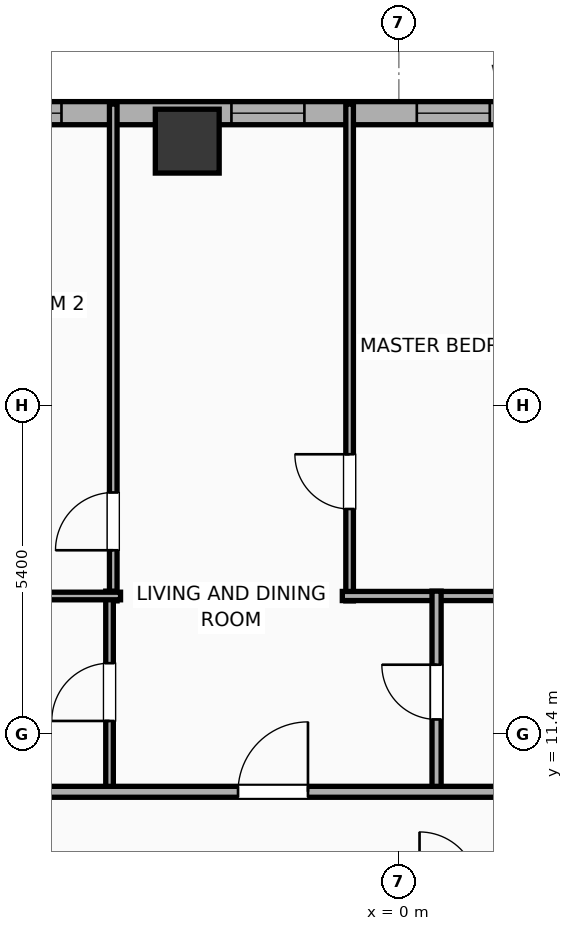
"""IFC4 building model, lengths in metres.
Left out: names, types, materials, properties, quantities, classifications, styles, units other than length and angle.
Written with IfcOpenShell. Run it as: python <this file> out.ifc"""

import sys

from ifc_helpers import new_model, si_unit, direction, frame, frame_2d, origin, origin_2d, place, context, subcontext, project, spatial, rectangle, hollow_rectangle, extrude, element, fill, save


model = new_model("IFC4")
c1 = context("Model", 3, precision=1e-05, world=origin(), true_north=direction((0.0, 1.0)))
c2 = subcontext(c1, "Body", "Model", "MODEL_VIEW")
j1 = project(units=[si_unit("LENGTHUNIT", "METRE"), si_unit("PLANEANGLEUNIT", "RADIAN")], contexts=[c1])
p1 = place(None, origin())
s1 = spatial("IfcSite", under=j1, at=p1, CompositionType="ELEMENT")
p2 = place(p1, origin())
s2 = spatial("IfcBuilding", under=s1, at=p2, CompositionType="ELEMENT")
p3 = place(p2, frame((0.0, 0.0, 93.6)))
s3 = spatial("IfcBuildingStorey", under=s2, at=p3, CompositionType="ELEMENT", Elevation=93.6)
p4 = place(p3, frame((-3.48, 21.15, 0.0), z_axis=(0.0, 0.0, 1.0), x_axis=(1.0, 0.0, 0.0)))
e1 = element("IfcColumn", 1, at=p4, inside=s3, PredefinedType="COLUMN", context=c2, shape_type="SweptSolid", body=[
    extrude(hollow_rectangle(XDim=1.05, YDim=1.05, WallThickness=0.036, at=origin_2d()), origin(), (0.0, 0.0, 1.0), 3.9),
])
p5 = place(p3, frame((-25.381, 21.61, 0.0), z_axis=(0.0, 0.0, 1.0), x_axis=(1.0, 0.0, 0.0)))
e2 = element("IfcWall", 2, at=p5, inside=s3, PredefinedType="ELEMENTEDWALL", context=c2, shape_type="SweptSolid", body=[
    extrude(rectangle(XDim=54.763, YDim=0.38, at=frame_2d((27.381, 0.0))), origin(), (0.0, 0.0, 1.0), 3.65),
])
p6 = place(p5, frame((4.795, 0.0, 0.75)))
e3 = element("IfcOpeningElement", 3, at=p6, cuts=e2, PredefinedType="OPENING", context=c2, shape_type="SweptSolid", body=[
    extrude(rectangle(XDim=2.4, YDim=2.1, at=frame_2d((1.2, 1.05))), frame((0.0, 0.2, 0.0), z_axis=(0.0, -1.0, 0.0), x_axis=(1.0, 0.0, 0.0)), (0.0, 0.0, 1.0), 0.4),
])
p7 = place(p5, frame((2.377, 0.0, 0.75)))
e4 = element("IfcOpeningElement", 4, at=p7, cuts=e2, PredefinedType="OPENING", context=c2, shape_type="SweptSolid", body=[
    extrude(rectangle(XDim=1.2, YDim=2.05, at=frame_2d((0.6, 1.025))), frame((0.0, 0.2, 0.0), z_axis=(0.0, -1.0, 0.0), x_axis=(1.0, 0.0, 0.0)), (0.0, 0.0, 1.0), 0.4),
])
p8 = place(p5, frame((11.707, 0.0, 0.75)))
e5 = element("IfcOpeningElement", 5, at=p8, cuts=e2, PredefinedType="OPENING", context=c2, shape_type="SweptSolid", body=[
    extrude(rectangle(XDim=1.2, YDim=2.05, at=frame_2d((0.6, 1.025))), frame((0.0, 0.2, 0.0), z_axis=(0.0, -1.0, 0.0), x_axis=(1.0, 0.0, 0.0)), (0.0, 0.0, 1.0), 0.4),
])
p9 = place(p5, frame((8.312, 0.0, 0.75)))
e6 = element("IfcOpeningElement", 6, at=p9, cuts=e2, PredefinedType="OPENING", context=c2, shape_type="SweptSolid", body=[
    extrude(rectangle(XDim=1.2, YDim=2.05, at=frame_2d((0.6, 1.025))), frame((0.0, 0.2, 0.0), z_axis=(0.0, -1.0, 0.0), x_axis=(1.0, 0.0, 0.0)), (0.0, 0.0, 1.0), 0.4),
])
p10 = place(p5, frame((15.476, 0.0, 0.75)))
e7 = element("IfcOpeningElement", 7, at=p10, cuts=e2, PredefinedType="OPENING", context=c2, shape_type="SweptSolid", body=[
    extrude(rectangle(XDim=1.2, YDim=2.05, at=frame_2d((0.6, 1.025))), frame((0.0, 0.2, 0.0), z_axis=(0.0, -1.0, 0.0), x_axis=(1.0, 0.0, 0.0)), (0.0, 0.0, 1.0), 0.4),
])
p11 = place(p5, frame((22.628, 0.0, 0.75)))
e8 = element("IfcOpeningElement", 8, at=p11, cuts=e2, PredefinedType="OPENING", context=c2, shape_type="SweptSolid", body=[
    extrude(rectangle(XDim=1.2, YDim=2.05, at=frame_2d((0.6, 1.025))), frame((0.0, 0.2, 0.0), z_axis=(0.0, -1.0, 0.0), x_axis=(1.0, 0.0, 0.0)), (0.0, 0.0, 1.0), 0.4),
])
p12 = place(p5, frame((18.633, 0.0, 0.75)))
e9 = element("IfcOpeningElement", 9, at=p12, cuts=e2, PredefinedType="OPENING", context=c2, shape_type="SweptSolid", body=[
    extrude(rectangle(XDim=1.2, YDim=2.05, at=frame_2d((0.6, 1.025))), frame((0.0, 0.2, 0.0), z_axis=(0.0, -1.0, 0.0), x_axis=(1.0, 0.0, 0.0)), (0.0, 0.0, 1.0), 0.4),
])
p13 = place(p5, frame((25.676, 0.0, 0.75)))
e10 = element("IfcOpeningElement", 10, at=p13, cuts=e2, PredefinedType="OPENING", context=c2, shape_type="SweptSolid", body=[
    extrude(rectangle(XDim=1.2, YDim=2.05, at=frame_2d((0.6, 1.025))), frame((0.0, 0.2, 0.0), z_axis=(0.0, -1.0, 0.0), x_axis=(1.0, 0.0, 0.0)), (0.0, 0.0, 1.0), 0.4),
])
p14 = place(p5, frame((30.881, 0.0, 0.75)))
e11 = element("IfcOpeningElement", 11, at=p14, cuts=e2, PredefinedType="OPENING", context=c2, shape_type="SweptSolid", body=[
    extrude(rectangle(XDim=1.2, YDim=2.05, at=frame_2d((0.6, 1.025))), frame((0.0, 0.2, 0.0), z_axis=(0.0, -1.0, 0.0), x_axis=(1.0, 0.0, 0.0)), (0.0, 0.0, 1.0), 0.4),
])
p15 = place(p5, frame((28.686, 0.0, 0.75)))
e12 = element("IfcOpeningElement", 12, at=p15, cuts=e2, PredefinedType="OPENING", context=c2, shape_type="SweptSolid", body=[
    extrude(rectangle(XDim=1.2, YDim=2.05, at=frame_2d((0.6, 1.025))), frame((0.0, 0.2, 0.0), z_axis=(0.0, -1.0, 0.0), x_axis=(1.0, 0.0, 0.0)), (0.0, 0.0, 1.0), 0.4),
])
p16 = place(p5, frame((35.876, 0.0, 0.75)))
e13 = element("IfcOpeningElement", 13, at=p16, cuts=e2, PredefinedType="OPENING", context=c2, shape_type="SweptSolid", body=[
    extrude(rectangle(XDim=1.2, YDim=2.05, at=frame_2d((0.6, 1.025))), frame((0.0, 0.2, 0.0), z_axis=(0.0, -1.0, 0.0), x_axis=(1.0, 0.0, 0.0)), (0.0, 0.0, 1.0), 0.4),
])
p17 = place(p5, frame((40.976, 0.0, 0.75)))
e14 = element("IfcOpeningElement", 14, at=p17, cuts=e2, PredefinedType="OPENING", context=c2, shape_type="SweptSolid", body=[
    extrude(rectangle(XDim=1.2, YDim=2.05, at=frame_2d((0.6, 1.025))), frame((0.0, 0.2, 0.0), z_axis=(0.0, -1.0, 0.0), x_axis=(1.0, 0.0, 0.0)), (0.0, 0.0, 1.0), 0.4),
])
p18 = place(p5, frame((46.076, 0.0, 0.75)))
e15 = element("IfcOpeningElement", 15, at=p18, cuts=e2, PredefinedType="OPENING", context=c2, shape_type="SweptSolid", body=[
    extrude(rectangle(XDim=1.2, YDim=2.05, at=frame_2d((0.6, 1.025))), frame((0.0, 0.2, 0.0), z_axis=(0.0, -1.0, 0.0), x_axis=(1.0, 0.0, 0.0)), (0.0, 0.0, 1.0), 0.4),
])
p19 = place(p5, frame((50.527, 0.0, 0.75)))
e16 = element("IfcOpeningElement", 16, at=p19, cuts=e2, PredefinedType="OPENING", context=c2, shape_type="SweptSolid", body=[
    extrude(rectangle(XDim=1.2, YDim=2.05, at=frame_2d((0.6, 1.025))), frame((0.0, 0.2, 0.0), z_axis=(0.0, -1.0, 0.0), x_axis=(1.0, 0.0, 0.0)), (0.0, 0.0, 1.0), 0.4),
])
p20 = place(p3, frame((-4.697, 13.59, 0.0), z_axis=(0.0, 0.0, 1.0), x_axis=(0.0, 1.0, 0.0)))
e17 = element("IfcWall", 17, at=p20, inside=s3, PredefinedType="PARTITIONING", context=c2, shape_type="SweptSolid", body=[
    extrude(rectangle(XDim=8.17, YDim=0.125, at=frame_2d((4.085, 0.0))), origin(), (0.0, 0.0, 1.0), 3.65),
])
p21 = place(p20, frame((0.832, 0.0, 0.0)))
e18 = element("IfcOpeningElement", 18, at=p21, cuts=e17, PredefinedType="OPENING", context=c2, shape_type="SweptSolid", body=[
    extrude(rectangle(XDim=0.95, YDim=2.05, at=frame_2d((0.475, 1.025))), frame((0.0, 0.073, 0.0), z_axis=(0.0, -1.0, 0.0), x_axis=(1.0, 0.0, 0.0)), (0.0, 0.0, 1.0), 0.145),
])
p22 = place(p3, frame((-0.81, 13.59, 0.0), z_axis=(0.0, 0.0, 1.0), x_axis=(0.0, 1.0, 0.0)))
e19 = element("IfcWall", 19, at=p22, inside=s3, PredefinedType="PARTITIONING", context=c2, shape_type="SweptSolid", body=[
    extrude(rectangle(XDim=8.17, YDim=0.125, at=frame_2d((4.085, 0.0))), origin(), (0.0, 0.0, 1.0), 3.65),
])
p23 = place(p22, frame((1.511, 0.0, 0.0)))
e20 = element("IfcOpeningElement", 20, at=p23, cuts=e19, PredefinedType="OPENING", context=c2, shape_type="SweptSolid", body=[
    extrude(rectangle(XDim=0.9, YDim=2.05, at=frame_2d((0.45, 1.025))), frame((0.0, 0.073, 0.0), z_axis=(0.0, -1.0, 0.0), x_axis=(1.0, 0.0, 0.0)), (0.0, 0.0, 1.0), 0.145),
])
p24 = place(p3, frame((-0.93, 13.67, 0.0), z_axis=(0.0, 0.0, 1.0), x_axis=(1.0, 0.0, 0.0)))
e21 = element("IfcWall", 21, at=p24, inside=s3, PredefinedType="PLUMBINGWALL", context=c2, shape_type="SweptSolid", body=[
    extrude(rectangle(XDim=3.605, YDim=0.15, at=frame_2d((1.802, 0.0))), origin(), (0.0, 0.0, 1.0), 3.65),
])
p25 = place(p3, frame((-4.758, 10.43, 0.0), z_axis=(0.0, 0.0, 1.0), x_axis=(0.0, 1.0, 0.0)))
e22 = element("IfcWall", 22, at=p25, inside=s3, PredefinedType="PARTITIONING", context=c2, shape_type="SweptSolid", body=[
    extrude(rectangle(XDim=3.32, YDim=0.125, at=frame_2d((1.66, 0.0))), origin(), (0.0, 0.0, 1.0), 3.65),
])
p26 = place(p25, frame((1.185, 0.0, 0.0)))
e23 = element("IfcOpeningElement", 23, at=p26, cuts=e22, PredefinedType="OPENING", context=c2, shape_type="SweptSolid", body=[
    extrude(rectangle(XDim=0.95, YDim=2.05, at=frame_2d((0.475, 1.025))), frame((0.0, 0.073, 0.0), z_axis=(0.0, -1.0, 0.0), x_axis=(1.0, 0.0, 0.0)), (0.0, 0.0, 1.0), 0.145),
])
p27 = place(p3, frame((-7.675, 13.67, 0.0), z_axis=(0.0, 0.0, 1.0), x_axis=(1.0, 0.0, 0.0)))
e24 = element("IfcWall", 24, at=p27, inside=s3, PredefinedType="PARTITIONING", context=c2, shape_type="SweptSolid", body=[
    extrude(rectangle(XDim=3.098, YDim=0.125, at=frame_2d((1.549, 0.0))), origin(), (0.0, 0.0, 1.0), 3.65),
])
p28 = place(p3, frame((0.62, 10.43, 0.0), z_axis=(0.0, 0.0, 1.0), x_axis=(0.0, 1.0, 0.0)))
e25 = element("IfcWall", 25, at=p28, inside=s3, PredefinedType="PLUMBINGWALL", context=c2, shape_type="SweptSolid", body=[
    extrude(rectangle(XDim=3.32, YDim=0.15, at=frame_2d((1.66, 0.0))), origin(), (0.0, 0.0, 1.0), 3.65),
])
p29 = place(p28, frame((1.21, 0.0, 0.0)))
e26 = element("IfcOpeningElement", 26, at=p29, cuts=e25, PredefinedType="OPENING", context=c2, shape_type="SweptSolid", body=[
    extrude(rectangle(XDim=0.9, YDim=2.05, at=frame_2d((0.45, 1.025))), frame((0.0, 0.085, 0.0), z_axis=(0.0, -1.0, 0.0), x_axis=(1.0, 0.0, 0.0)), (0.0, 0.0, 1.0), 0.17),
])
p30 = place(p3, frame((-29.21, 10.45, 0.0), z_axis=(0.0, 0.0, 1.0), x_axis=(1.0, 0.0, 0.0)))
e27 = element("IfcWall", 27, at=p30, inside=s3, PredefinedType="PARTITIONING", context=c2, shape_type="SweptSolid", body=[
    extrude(rectangle(XDim=62.42, YDim=0.18, at=frame_2d((31.21, 0.0))), origin(), (0.0, 0.0, 1.0), 3.65),
])
p31 = place(p30, frame((2.534, 0.0, 0.0)))
e28 = element("IfcOpeningElement", 28, at=p31, cuts=e27, PredefinedType="OPENING", context=c2, shape_type="SweptSolid", body=[
    extrude(rectangle(XDim=0.9, YDim=2.05, at=frame_2d((0.45, 1.025))), frame((0.0, 0.1, 0.0), z_axis=(0.0, -1.0, 0.0), x_axis=(1.0, 0.0, 0.0)), (0.0, 0.0, 1.0), 0.2),
])
p32 = place(p30, frame((9.056, 0.0, 0.0)))
e29 = element("IfcOpeningElement", 29, at=p32, cuts=e27, PredefinedType="OPENING", context=c2, shape_type="SweptSolid", body=[
    extrude(rectangle(XDim=1.15, YDim=2.05, at=frame_2d((0.575, 1.025))), frame((0.0, 0.1, 0.0), z_axis=(0.0, -1.0, 0.0), x_axis=(1.0, 0.0, 0.0)), (0.0, 0.0, 1.0), 0.2),
])
p33 = place(p30, frame((16.303, 0.0, 0.0)))
e30 = element("IfcOpeningElement", 30, at=p33, cuts=e27, PredefinedType="OPENING", context=c2, shape_type="SweptSolid", body=[
    extrude(rectangle(XDim=1.15, YDim=2.05, at=frame_2d((0.575, 1.025))), frame((0.0, 0.1, 0.0), z_axis=(0.0, -1.0, 0.0), x_axis=(1.0, 0.0, 0.0)), (0.0, 0.0, 1.0), 0.2),
])
p34 = place(p30, frame((26.565, 0.0, 0.0)))
e31 = element("IfcOpeningElement", 31, at=p34, cuts=e27, PredefinedType="OPENING", context=c2, shape_type="SweptSolid", body=[
    extrude(rectangle(XDim=1.15, YDim=2.05, at=frame_2d((0.575, 1.025))), frame((0.0, 0.1, 0.0), z_axis=(0.0, -1.0, 0.0), x_axis=(1.0, 0.0, 0.0)), (0.0, 0.0, 1.0), 0.2),
])
p35 = place(p30, frame((36.677, 0.0, 0.0)))
e32 = element("IfcOpeningElement", 32, at=p35, cuts=e27, PredefinedType="OPENING", context=c2, shape_type="SweptSolid", body=[
    extrude(rectangle(XDim=1.15, YDim=2.05, at=frame_2d((0.575, 1.025))), frame((0.0, 0.1, 0.0), z_axis=(0.0, -1.0, 0.0), x_axis=(1.0, 0.0, 0.0)), (0.0, 0.0, 1.0), 0.2),
])
p36 = place(p30, frame((46.939, 0.0, 0.0)))
e33 = element("IfcOpeningElement", 33, at=p36, cuts=e27, PredefinedType="OPENING", context=c2, shape_type="SweptSolid", body=[
    extrude(rectangle(XDim=1.15, YDim=2.05, at=frame_2d((0.575, 1.025))), frame((0.0, 0.1, 0.0), z_axis=(0.0, -1.0, 0.0), x_axis=(1.0, 0.0, 0.0)), (0.0, 0.0, 1.0), 0.2),
])
p37 = place(p30, frame((57.245, 0.0, 0.0)))
e34 = element("IfcOpeningElement", 34, at=p37, cuts=e27, PredefinedType="OPENING", context=c2, shape_type="SweptSolid", body=[
    extrude(rectangle(XDim=1.15, YDim=2.05, at=frame_2d((0.575, 1.025))), frame((0.0, 0.1, 0.0), z_axis=(0.0, -1.0, 0.0), x_axis=(1.0, 0.0, 0.0)), (0.0, 0.0, 1.0), 0.2),
])
p38 = place(p11, origin())
e35 = element("IfcWindow", 35, at=p38, inside=s3, PartitioningType="SINGLE_PANEL", PredefinedType="WINDOW", context=c2, shape_type="SweptSolid", body=[
    extrude(rectangle(XDim=1.2, YDim=2.05, at=frame_2d((0.6, 1.025))), frame((0.0, 0.03, 0.0), z_axis=(0.0, -1.0, 0.0), x_axis=(1.0, 0.0, 0.0)), (0.0, 0.0, 1.0), 0.06),
])
fill(e8, e35)
p39 = place(p12, origin())
e36 = element("IfcWindow", 36, at=p39, inside=s3, PartitioningType="SINGLE_PANEL", PredefinedType="WINDOW", context=c2, shape_type="SweptSolid", body=[
    extrude(rectangle(XDim=1.2, YDim=2.05, at=frame_2d((0.6, 1.025))), frame((0.0, 0.03, 0.0), z_axis=(0.0, -1.0, 0.0), x_axis=(1.0, 0.0, 0.0)), (0.0, 0.0, 1.0), 0.06),
])
fill(e9, e36)
p40 = place(p13, origin())
e37 = element("IfcWindow", 37, at=p40, inside=s3, PartitioningType="SINGLE_PANEL", PredefinedType="WINDOW", context=c2, shape_type="SweptSolid", body=[
    extrude(rectangle(XDim=1.2, YDim=2.05, at=frame_2d((0.6, 1.025))), frame((0.0, 0.03, 0.0), z_axis=(0.0, -1.0, 0.0), x_axis=(1.0, 0.0, 0.0)), (0.0, 0.0, 1.0), 0.06),
])
fill(e10, e37)
p41 = place(p21, origin())
e38 = element("IfcDoor", 38, at=p41, inside=s3, OperationType="SINGLE_SWING_LEFT", PredefinedType="DOOR", context=c2, shape_type="SweptSolid", body=[
    extrude(rectangle(XDim=0.95, YDim=2.05, at=frame_2d((0.475, 1.025))), frame((0.0, 0.025, 0.0), z_axis=(0.0, -1.0, 0.0), x_axis=(1.0, 0.0, 0.0)), (0.0, 0.0, 1.0), 0.05),
])
fill(e18, e38)
p42 = place(p23, origin())
e39 = element("IfcDoor", 39, at=p42, inside=s3, OperationType="SINGLE_SWING_RIGHT", PredefinedType="DOOR", context=c2, shape_type="SweptSolid", body=[
    extrude(rectangle(XDim=0.9, YDim=2.05, at=frame_2d((0.45, 1.025))), frame((0.0, 0.025, 0.0), z_axis=(0.0, -1.0, 0.0), x_axis=(1.0, 0.0, 0.0)), (0.0, 0.0, 1.0), 0.05),
])
fill(e20, e39)
p43 = place(p26, origin())
e40 = element("IfcDoor", 40, at=p43, inside=s3, OperationType="SINGLE_SWING_LEFT", PredefinedType="DOOR", context=c2, shape_type="SweptSolid", body=[
    extrude(rectangle(XDim=0.95, YDim=2.05, at=frame_2d((0.475, 1.025))), frame((0.0, 0.025, 0.0), z_axis=(0.0, -1.0, 0.0), x_axis=(1.0, 0.0, 0.0)), (0.0, 0.0, 1.0), 0.05),
])
fill(e23, e40)
p44 = place(p29, origin())
e41 = element("IfcDoor", 41, at=p44, inside=s3, OperationType="SINGLE_SWING_RIGHT", PredefinedType="DOOR", context=c2, shape_type="SweptSolid", body=[
    extrude(rectangle(XDim=0.9, YDim=2.05, at=frame_2d((0.45, 1.025))), frame((0.0, 0.025, 0.0), z_axis=(0.0, -1.0, 0.0), x_axis=(1.0, 0.0, 0.0)), (0.0, 0.0, 1.0), 0.05),
])
fill(e26, e41)
p45 = place(p34, origin())
e42 = element("IfcDoor", 42, at=p45, inside=s3, OperationType="SINGLE_SWING_RIGHT", PredefinedType="DOOR", context=c2, shape_type="SweptSolid", body=[
    extrude(rectangle(XDim=1.15, YDim=2.05, at=frame_2d((0.575, 1.025))), frame((0.0, 0.025, 0.0), z_axis=(0.0, -1.0, 0.0), x_axis=(1.0, 0.0, 0.0)), (0.0, 0.0, 1.0), 0.05),
])
fill(e31, e42)
save(model, sys.argv[1])
